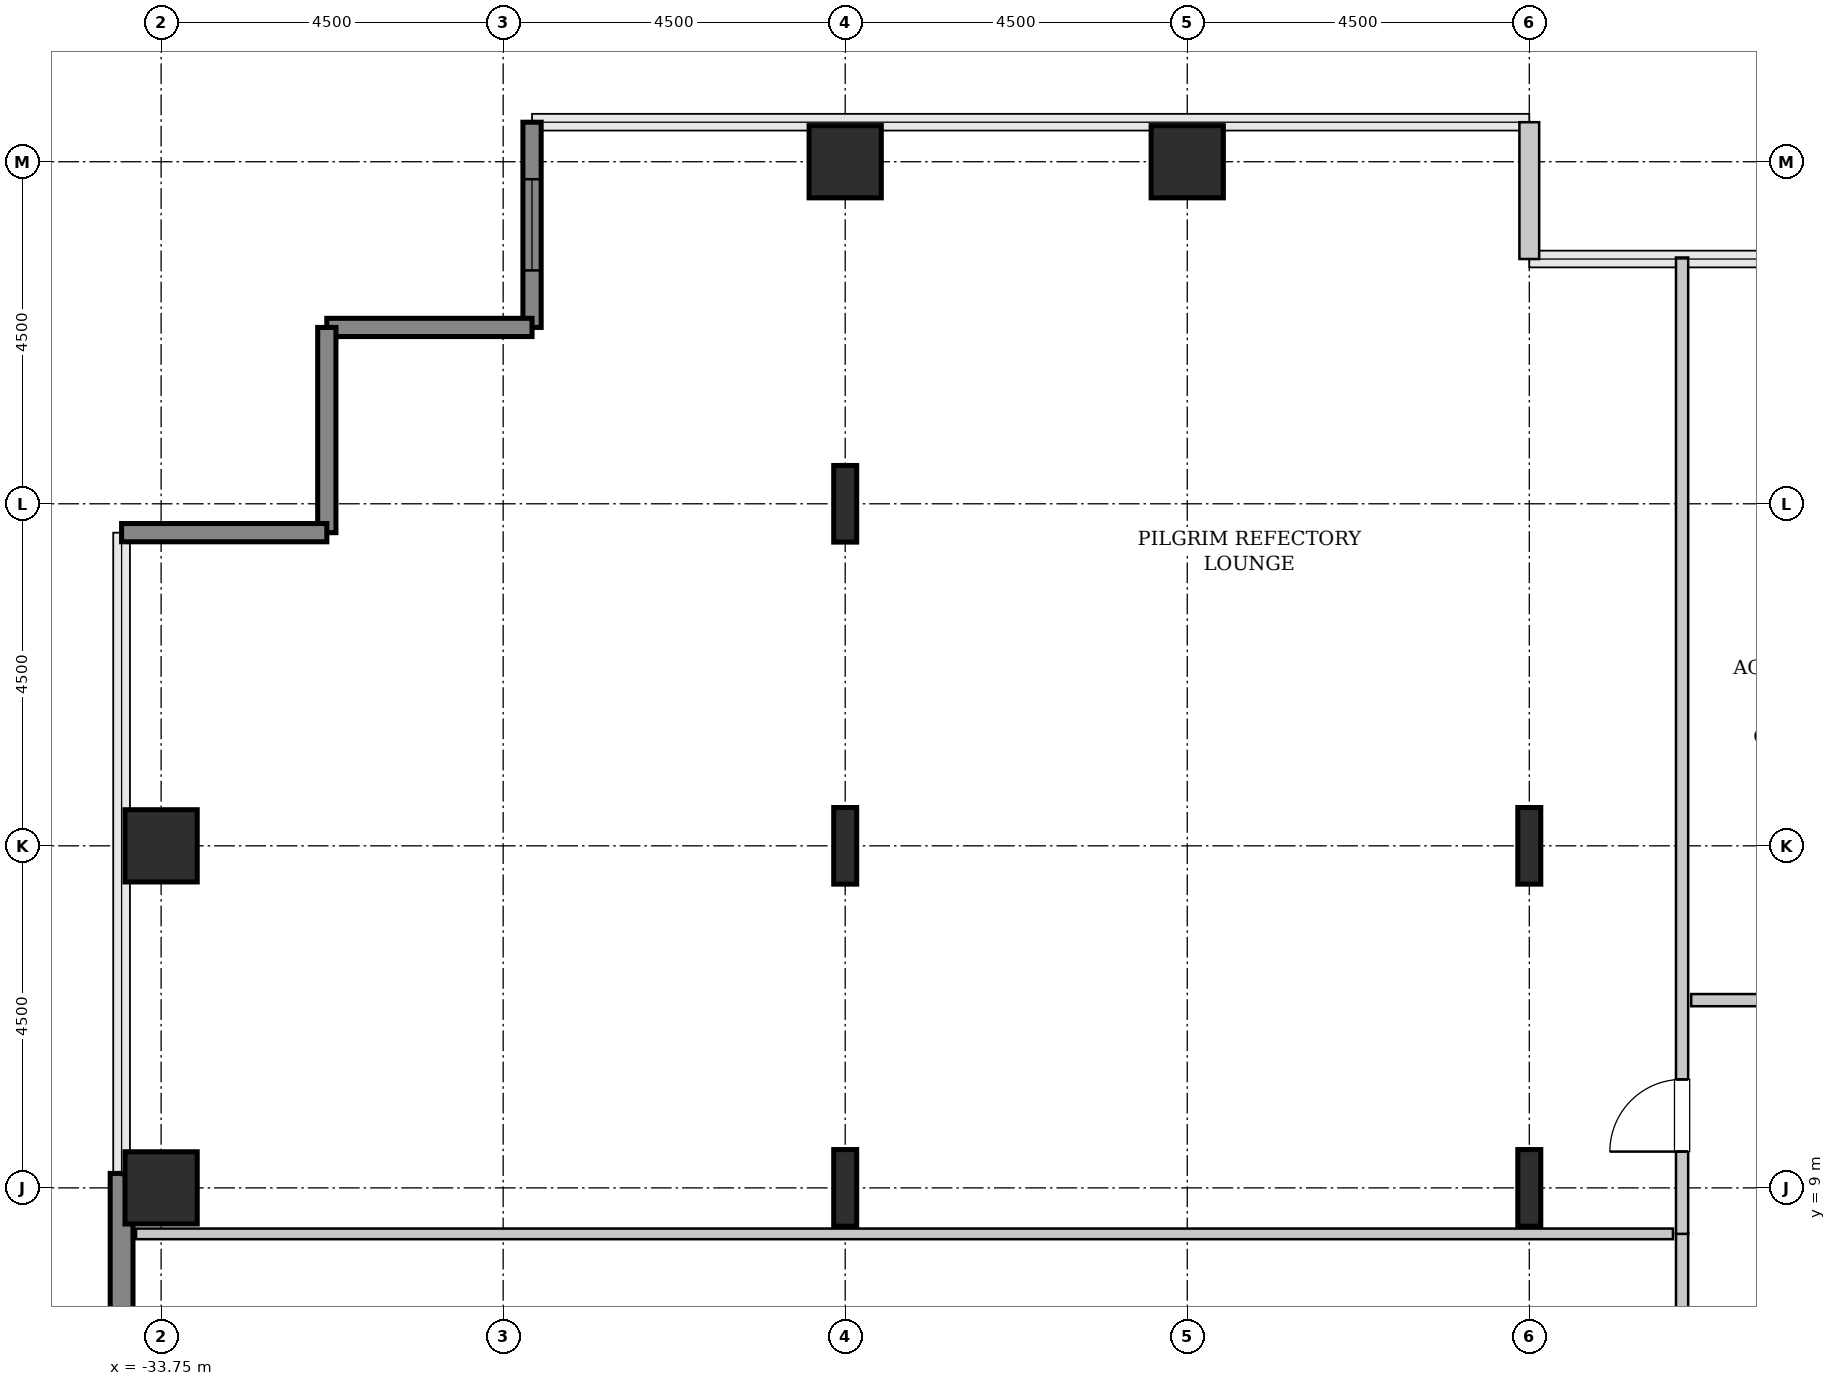
"""IFC4 building model, lengths in metres.
Left out: names, types, materials, properties, quantities, classifications, styles, units other than length and angle.
Written with IfcOpenShell. Run it as: python <this file> out.ifc"""

import sys

from ifc_helpers import new_model, si_unit, direction, frame, frame_2d, origin, origin_2d, place, context, subcontext, project, spatial, rectangle, hollow_rectangle, i_section, extrude, source, transform, mapped, element, fill, save


model = new_model("IFC4")
c1 = context("Model", 3, precision=1e-05, world=origin(), true_north=direction((0.0, 1.0)))
c2 = subcontext(c1, "Body", "Model", "MODEL_VIEW")
j1 = project(units=[si_unit("LENGTHUNIT", "METRE"), si_unit("PLANEANGLEUNIT", "RADIAN")], contexts=[c1])
p1 = place(None, origin())
s1 = spatial("IfcSite", under=j1, at=p1, CompositionType="ELEMENT")
p2 = place(p1, origin())
s2 = spatial("IfcBuilding", under=s1, at=p2, CompositionType="ELEMENT")
p3 = place(p2, frame((0.0, 0.0, 44.4)))
s3 = spatial("IfcBuildingStorey", under=s2, at=p3, CompositionType="ELEMENT", Elevation=44.4)
m1 = source(origin(), c2, "Body", "SweptSolid", [
    extrude(hollow_rectangle(XDim=0.95, YDim=0.95, WallThickness=0.045, InnerFilletRadius=0.045, OuterFilletRadius=0.09, at=origin_2d()), origin(), (0.0, 0.0, 1.0), 3.8),
])
for number, where, z_axis, x_axis in (
    (1, (-33.75, 9.0, 0.0), (0.0, 0.0, 1.0), (1.0, 0.0, 0.0)),
    (2, (-33.75, 13.5, 0.0), (0.0, 0.0, 1.0), (1.0, 0.0, 0.0)),
):
    element("IfcColumn", number, at=place(p3, frame(where, z_axis=z_axis, x_axis=x_axis)), inside=s3, PredefinedType="COLUMN", context=c2, shape_type="MappedRepresentation", body=[
        mapped(m1, transform((0.0, 0.0, 0.0), x_axis=(1.0, 0.0, 0.0), y_axis=(0.0, 1.0, 0.0), z_axis=(0.0, 0.0, 1.0), scale=1.0)),
    ])
m2 = source(origin(), c2, "Body", "SweptSolid", [
    extrude(i_section(OverallWidth=0.302, OverallDepth=1.008, WebThickness=0.021, FlangeThickness=0.04, FilletRadius=0.03, at=origin_2d()), origin(), (0.0, 0.0, 1.0), 3.8),
])
for number, where, z_axis, x_axis in (
    (3, (-24.75, 9.0, 0.0), (0.0, 0.0, 1.0), (1.0, 0.0, 0.0)),
    (4, (-24.75, 13.5, 0.0), (0.0, 0.0, 1.0), (1.0, 0.0, 0.0)),
    (5, (-24.75, 18.0, 0.0), (0.0, 0.0, 1.0), (1.0, 0.0, 0.0)),
):
    element("IfcColumn", number, at=place(p3, frame(where, z_axis=z_axis, x_axis=x_axis)), inside=s3, PredefinedType="COLUMN", context=c2, shape_type="MappedRepresentation", body=[
        mapped(m2, transform((0.0, 0.0, 0.0), x_axis=(1.0, 0.0, 0.0), y_axis=(0.0, 1.0, 0.0), z_axis=(0.0, 0.0, 1.0), scale=1.0)),
    ])
for number, where, z_axis, x_axis in (
    (6, (-24.75, 22.5, 0.0), (0.0, 0.0, 1.0), (1.0, 0.0, 0.0)),
    (7, (-20.25, 22.5, 0.0), (0.0, 0.0, 1.0), (1.0, 0.0, 0.0)),
):
    element("IfcColumn", number, at=place(p3, frame(where, z_axis=z_axis, x_axis=x_axis)), inside=s3, PredefinedType="COLUMN", context=c2, shape_type="MappedRepresentation", body=[
        mapped(m1, transform((0.0, 0.0, 0.0), x_axis=(1.0, 0.0, 0.0), y_axis=(0.0, 1.0, 0.0), z_axis=(0.0, 0.0, 1.0), scale=1.0)),
    ])
for number, where, z_axis, x_axis in (
    (8, (-15.75, 9.0, 0.0), (0.0, 0.0, 1.0), (1.0, 0.0, 0.0)),
    (9, (-15.75, 13.5, 0.0), (0.0, 0.0, 1.0), (1.0, 0.0, 0.0)),
):
    element("IfcColumn", number, at=place(p3, frame(where, z_axis=z_axis, x_axis=x_axis)), inside=s3, PredefinedType="COLUMN", context=c2, shape_type="MappedRepresentation", body=[
        mapped(m2, transform((0.0, 0.0, 0.0), x_axis=(1.0, 0.0, 0.0), y_axis=(0.0, 1.0, 0.0), z_axis=(0.0, 0.0, 1.0), scale=1.0)),
    ])
m3 = source(origin(), c2, "Body", "SweptSolid", [
    extrude(rectangle(XDim=4.88, YDim=0.3, at=frame_2d((2.44, 0.0))), origin(), (0.0, 0.0, 1.0), 3.55),
])
p4 = place(p3, frame((-34.27, 4.31, 0.0), z_axis=(0.0, 0.0, 1.0), x_axis=(0.0, 1.0, 0.0)))
e10 = element("IfcWall", 10, at=p4, inside=s3, PredefinedType="SHEAR", context=c2, shape_type="MappedRepresentation", body=[
    mapped(m3, transform((0.0, 0.0, 0.0), x_axis=(1.0, 0.0, 0.0), y_axis=(0.0, 1.0, 0.0), z_axis=(0.0, 0.0, 1.0), scale=1.0)),
])
m4 = source(origin(), c2, "Body", "SweptSolid", [
    extrude(rectangle(XDim=1.8, YDim=0.26, at=frame_2d((0.9, 0.0))), origin(), (0.0, 0.0, 1.0), 3.55),
])
p5 = place(p3, frame((-15.75, 21.22, 0.0), z_axis=(0.0, 0.0, 1.0), x_axis=(0.0, 1.0, 0.0)))
e11 = element("IfcWall", 11, at=p5, inside=s3, PredefinedType="SOLIDWALL", context=c2, shape_type="MappedRepresentation", body=[
    mapped(m4, transform((0.0, 0.0, 0.0), x_axis=(1.0, 0.0, 0.0), y_axis=(0.0, 1.0, 0.0), z_axis=(0.0, 0.0, 1.0), scale=1.0)),
])
m5 = source(origin(), c2, "Body", "SweptSolid", [
    extrude(rectangle(XDim=2.7, YDim=0.24, at=frame_2d((1.35, 0.0))), origin(), (0.0, 0.0, 1.0), 3.55),
])
p6 = place(p3, frame((-28.87, 23.02, 0.0), z_axis=(0.0, 0.0, 1.0), x_axis=(0.0, -1.0, 0.0)))
e12 = element("IfcWall", 12, at=p6, inside=s3, PredefinedType="SHEAR", context=c2, shape_type="MappedRepresentation", body=[
    mapped(m5, transform((0.0, 0.0, 0.0), x_axis=(1.0, 0.0, 0.0), y_axis=(0.0, 1.0, 0.0), z_axis=(0.0, 0.0, 1.0), scale=1.0)),
])
p7 = place(p6, frame((0.75, 0.0, 0.85)))
e13 = element("IfcOpeningElement", 13, at=p7, cuts=e12, PredefinedType="OPENING", context=c2, shape_type="SweptSolid", body=[
    extrude(rectangle(XDim=1.2, YDim=1.8, at=frame_2d((0.6, 0.9))), frame((0.0, 0.13, 0.0), z_axis=(0.0, -1.0, 0.0), x_axis=(1.0, 0.0, 0.0)), (0.0, 0.0, 1.0), 0.26),
])
for number, where, z_axis, x_axis in (
    (14, (-28.87, 20.32, 0.0), (0.0, 0.0, 1.0), (-1.0, 0.0, 0.0)),
    (15, (-31.57, 20.32, 0.0), (0.0, 0.0, 1.0), (0.0, -1.0, 0.0)),
    (16, (-31.57, 17.62, 0.0), (0.0, 0.0, 1.0), (-1.0, 0.0, 0.0)),
):
    element("IfcWall", number, at=place(p3, frame(where, z_axis=z_axis, x_axis=x_axis)), inside=s3, PredefinedType="SHEAR", context=c2, shape_type="MappedRepresentation", body=[
        mapped(m5, transform((0.0, 0.0, 0.0), x_axis=(1.0, 0.0, 0.0), y_axis=(0.0, 1.0, 0.0), z_axis=(0.0, 0.0, 1.0), scale=1.0)),
    ])
m6 = source(origin(), c2, "Body", "SweptSolid", [
    extrude(rectangle(XDim=3.61, YDim=0.16, at=frame_2d((1.805, 0.0))), origin(), (0.0, 0.0, 1.0), 3.535),
])
p8 = place(p3, frame((-13.74, 4.795, 0.0), z_axis=(0.0, 0.0, 1.0), x_axis=(0.0, 1.0, 0.0)))
e17 = element("IfcWall", 17, at=p8, inside=s3, PredefinedType="PARTITIONING", context=c2, shape_type="MappedRepresentation", body=[
    mapped(m6, transform((0.0, 0.0, 0.0), x_axis=(1.0, 0.0, 0.0), y_axis=(0.0, 1.0, 0.0), z_axis=(0.0, 0.0, 1.0), scale=1.0)),
])
p9 = place(p8, frame((1.33, 0.0, 0.0)))
e18 = element("IfcOpeningElement", 18, at=p9, cuts=e17, PredefinedType="OPENING", context=c2, shape_type="SweptSolid", body=[
    extrude(rectangle(XDim=0.95, YDim=2.1, at=frame_2d((0.475, 1.05))), frame((0.0, 0.09, 0.0), z_axis=(0.0, -1.0, 0.0), x_axis=(1.0, 0.0, 0.0)), (0.0, 0.0, 1.0), 0.18),
])
m7 = source(origin(), c2, "Body", "SweptSolid", [
    extrude(rectangle(XDim=20.22, YDim=0.14, at=frame_2d((10.11, 0.0))), origin(), (0.0, 0.0, 1.0), 3.535),
])
p10 = place(p3, frame((-34.08, 8.395, 0.0), z_axis=(0.0, 0.0, 1.0), x_axis=(1.0, 0.0, 0.0)))
e19 = element("IfcWall", 19, at=p10, inside=s3, PredefinedType="PARTITIONING", context=c2, shape_type="MappedRepresentation", body=[
    mapped(m7, transform((0.0, 0.0, 0.0), x_axis=(1.0, 0.0, 0.0), y_axis=(0.0, 1.0, 0.0), z_axis=(0.0, 0.0, 1.0), scale=1.0)),
])
m8 = source(origin(), c2, "Body", "SweptSolid", [
    extrude(rectangle(XDim=12.845, YDim=0.16, at=frame_2d((6.422, 0.0))), origin(), (0.0, 0.0, 1.0), 3.535),
])
p11 = place(p3, frame((-13.74, 8.395, 0.0), z_axis=(0.0, 0.0, 1.0), x_axis=(0.0, 1.0, 0.0)))
e20 = element("IfcWall", 20, at=p11, inside=s3, PredefinedType="PARTITIONING", context=c2, shape_type="MappedRepresentation", body=[
    mapped(m8, transform((0.0, 0.0, 0.0), x_axis=(1.0, 0.0, 0.0), y_axis=(0.0, 1.0, 0.0), z_axis=(0.0, 0.0, 1.0), scale=1.0)),
])
p12 = place(p11, frame((1.083, 0.0, 0.0)))
e21 = element("IfcOpeningElement", 21, at=p12, cuts=e20, PredefinedType="OPENING", context=c2, shape_type="SweptSolid", body=[
    extrude(rectangle(XDim=0.95, YDim=2.1, at=frame_2d((0.475, 1.05))), frame((0.0, 0.09, 0.0), z_axis=(0.0, -1.0, 0.0), x_axis=(1.0, 0.0, 0.0)), (0.0, 0.0, 1.0), 0.18),
])
m9 = source(origin(), c2, "Body", "SweptSolid", [
    extrude(rectangle(XDim=4.125, YDim=0.16, at=frame_2d((2.062, 0.0))), origin(), (0.0, 0.0, 1.0), 3.535),
])
p13 = place(p3, frame((-13.62, 11.47, 0.0), z_axis=(0.0, 0.0, 1.0), x_axis=(1.0, 0.0, 0.0)))
e22 = element("IfcWall", 22, at=p13, inside=s3, PredefinedType="PARTITIONING", context=c2, shape_type="MappedRepresentation", body=[
    mapped(m9, transform((0.0, 0.0, 0.0), x_axis=(1.0, 0.0, 0.0), y_axis=(0.0, 1.0, 0.0), z_axis=(0.0, 0.0, 1.0), scale=1.0)),
])
p14 = place(p13, frame((1.587, 0.0, 0.0)))
e23 = element("IfcOpeningElement", 23, at=p14, cuts=e22, PredefinedType="OPENING", context=c2, shape_type="SweptSolid", body=[
    extrude(rectangle(XDim=0.95, YDim=2.1, at=frame_2d((0.475, 1.05))), frame((0.0, 0.09, 0.0), z_axis=(0.0, -1.0, 0.0), x_axis=(1.0, 0.0, 0.0)), (0.0, 0.0, 1.0), 0.18),
])
m10 = source(origin(), c2, "Body", "SweptSolid", [
    extrude(rectangle(XDim=1.2, YDim=1.8, at=frame_2d((0.6, 0.9))), frame((0.0, 0.03, 0.0), z_axis=(0.0, -1.0, 0.0), x_axis=(1.0, 0.0, 0.0)), (0.0, 0.0, 1.0), 0.06),
])
p15 = place(p7, origin())
e24 = element("IfcWindow", 24, at=p15, inside=s3, PartitioningType="SINGLE_PANEL", PredefinedType="WINDOW", context=c2, shape_type="MappedRepresentation", body=[
    mapped(m10, transform((0.0, 0.0, 0.0), x_axis=(1.0, 0.0, 0.0), y_axis=(0.0, 1.0, 0.0), z_axis=(0.0, 0.0, 1.0), scale=1.0)),
])
fill(e13, e24)
m11 = source(origin(), c2, "Body", "SweptSolid", [
    extrude(rectangle(XDim=0.95, YDim=2.1, at=frame_2d((0.475, 1.05))), frame((0.0, 0.025, 0.0), z_axis=(0.0, -1.0, 0.0), x_axis=(1.0, 0.0, 0.0)), (0.0, 0.0, 1.0), 0.05),
])
p16 = place(p12, origin())
e25 = element("IfcDoor", 25, at=p16, inside=s3, OperationType="SINGLE_SWING_LEFT", PredefinedType="DOOR", context=c2, shape_type="MappedRepresentation", body=[
    mapped(m11, transform((0.0, 0.0, 0.0), x_axis=(1.0, 0.0, 0.0), y_axis=(0.0, 1.0, 0.0), z_axis=(0.0, 0.0, 1.0), scale=1.0)),
])
fill(e21, e25)
save(model, sys.argv[1])
